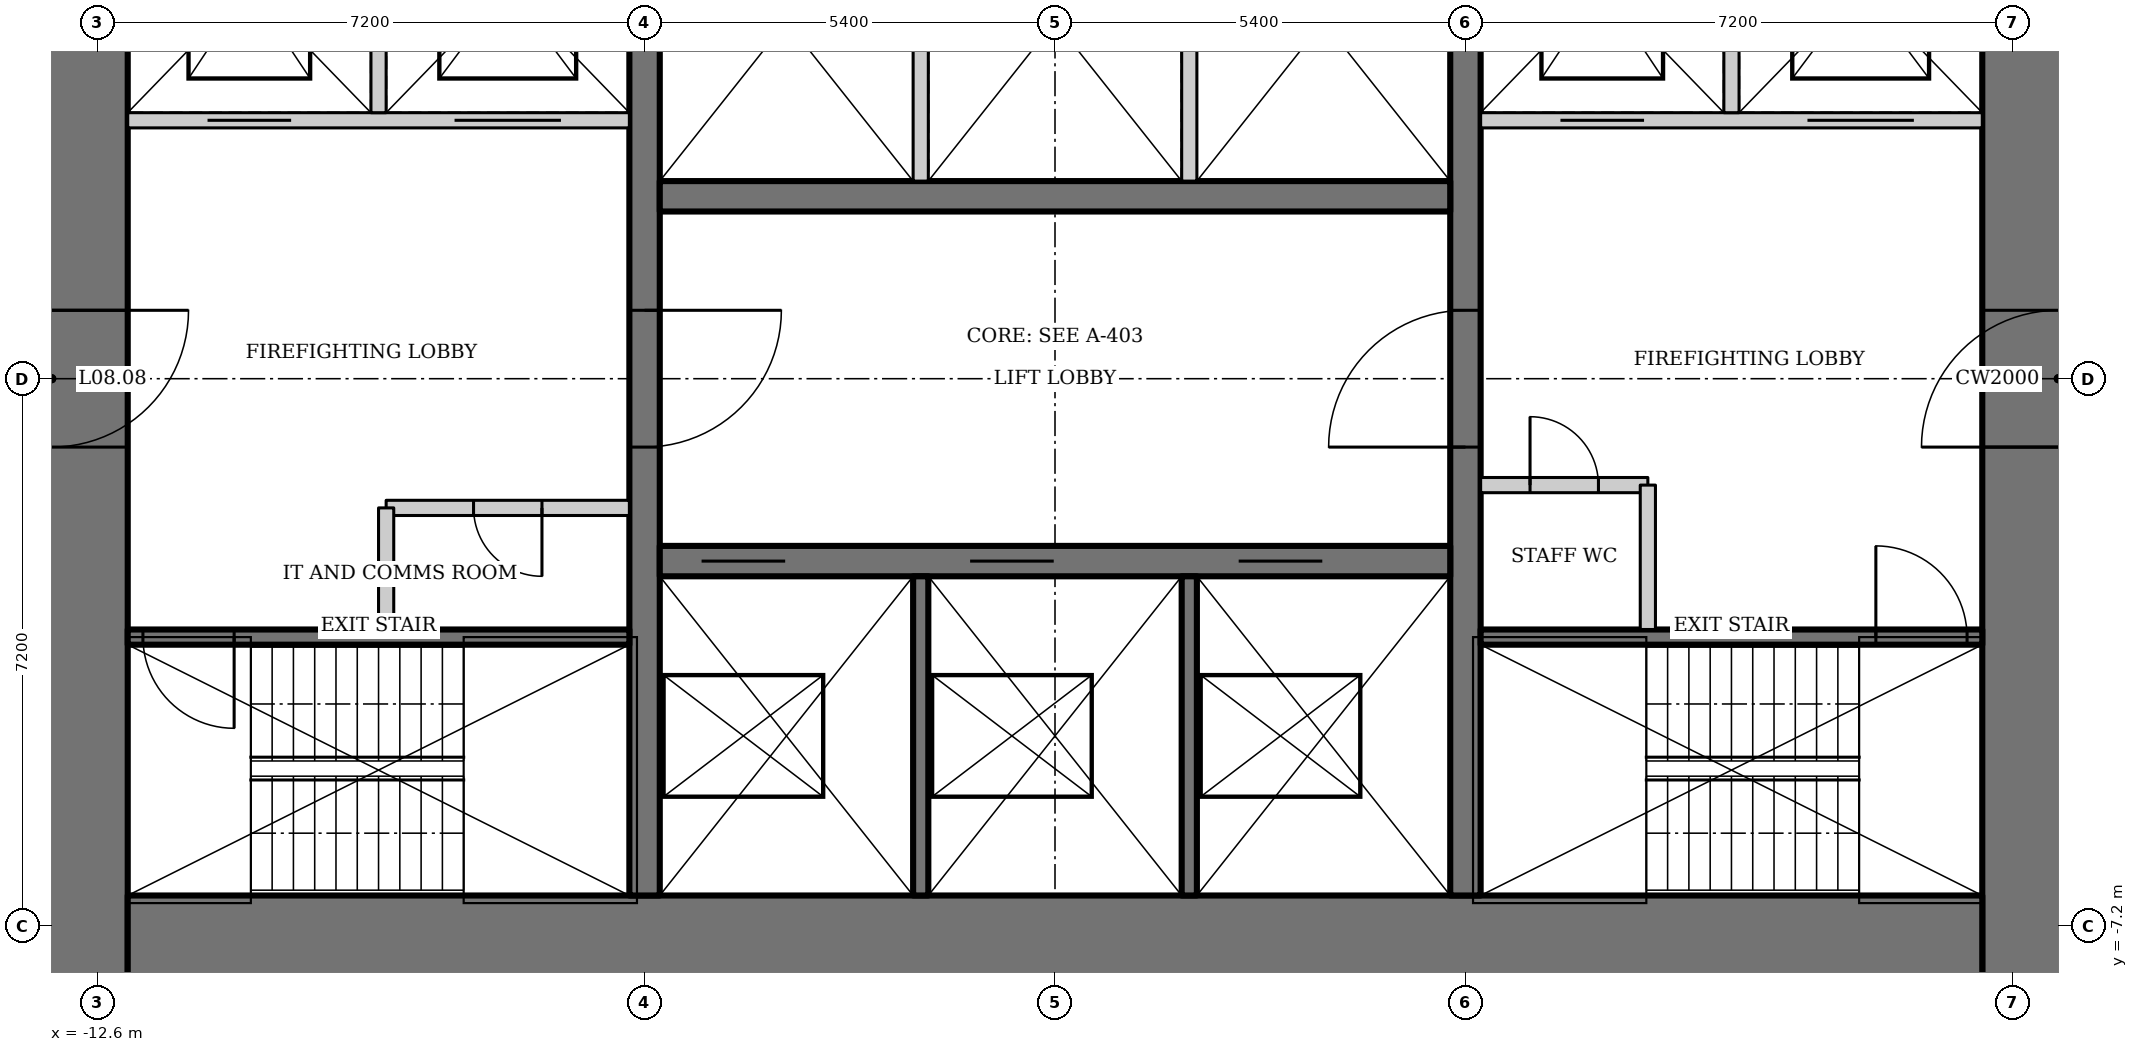
"""IFC4 building model, lengths in metres.
Left out: names, types, materials, properties, quantities, classifications, styles, units other than length and angle.
Written with IfcOpenShell. Run it as: python <this file> out.ifc"""

import sys

from ifc_helpers import new_model, si_unit, direction, frame, frame_2d, origin, place, context, subcontext, project, spatial, rectangle, extrude, element, fill, save


model = new_model("IFC4")
c1 = context("Model", 3, precision=1e-05, world=origin(), true_north=direction((0.0, 1.0)))
c2 = subcontext(c1, "Body", "Model", "MODEL_VIEW")
j1 = project(units=[si_unit("LENGTHUNIT", "METRE"), si_unit("PLANEANGLEUNIT", "RADIAN")], contexts=[c1])
p1 = place(None, origin())
s1 = spatial("IfcSite", under=j1, at=p1, CompositionType="ELEMENT")
p2 = place(p1, origin())
s2 = spatial("IfcBuilding", under=s1, at=p2, CompositionType="ELEMENT")
p3 = place(p2, frame((0.0, 0.0, 44.2)))
s3 = spatial("IfcBuildingStorey", under=s2, at=p3, CompositionType="ELEMENT", Elevation=44.2)
p4 = place(p3, frame((13.2, -13.0, 0.0), z_axis=(0.0, 0.0, 1.0), x_axis=(0.0, 1.0, 0.0)))
e1 = element("IfcWall", 1, at=p4, inside=s3, PredefinedType="SHEAR", context=c2, shape_type="SweptSolid", body=[
    extrude(rectangle(XDim=26.0, YDim=2.0, at=frame_2d((13.0, 0.0))), origin(), (0.0, 0.0, 1.0), 3.6),
])
p5 = place(p4, frame((12.1, 0.0, 0.0)))
e2 = element("IfcOpeningElement", 2, at=p5, cuts=e1, PredefinedType="OPENING", context=c2, shape_type="SweptSolid", body=[
    extrude(rectangle(XDim=1.8, YDim=2.1, at=frame_2d((0.9, 1.05))), frame((0.0, 1.01, 0.0), z_axis=(0.0, -1.0, 0.0), x_axis=(1.0, 0.0, 0.0)), (0.0, 0.0, 1.0), 2.02),
])
p6 = place(p3, frame((-13.2, 13.0, 0.0), z_axis=(0.0, 0.0, 1.0), x_axis=(0.0, -1.0, 0.0)))
e3 = element("IfcWall", 3, at=p6, inside=s3, PredefinedType="SHEAR", context=c2, shape_type="SweptSolid", body=[
    extrude(rectangle(XDim=26.0, YDim=2.0, at=frame_2d((13.0, 0.0))), origin(), (0.0, 0.0, 1.0), 3.6),
])
p7 = place(p6, frame((12.1, 0.0, 0.0)))
e4 = element("IfcOpeningElement", 4, at=p7, cuts=e3, PredefinedType="OPENING", context=c2, shape_type="SweptSolid", body=[
    extrude(rectangle(XDim=1.8, YDim=2.1, at=frame_2d((0.9, 1.05))), frame((0.0, 1.01, 0.0), z_axis=(0.0, -1.0, 0.0), x_axis=(1.0, 0.0, 0.0)), (0.0, 0.0, 1.0), 2.02),
])
p8 = place(p3, frame((-12.2, -8.0, 0.0), z_axis=(0.0, 0.0, 1.0), x_axis=(1.0, 0.0, 0.0)))
e5 = element("IfcWall", 5, at=p8, inside=s3, PredefinedType="SHEAR", context=c2, shape_type="SweptSolid", body=[
    extrude(rectangle(XDim=24.4, YDim=2.4, at=frame_2d((12.2, 0.0))), origin(), (0.0, 0.0, 1.0), 3.6),
])
p9 = place(p3, frame((5.4, -6.8, 0.0), z_axis=(0.0, 0.0, 1.0), x_axis=(0.0, 1.0, 0.0)))
e6 = element("IfcWall", 6, at=p9, inside=s3, PredefinedType="SHEAR", context=c2, shape_type="SweptSolid", body=[
    extrude(rectangle(XDim=13.6, YDim=0.4, at=frame_2d((6.8, 0.0))), origin(), (0.0, 0.0, 1.0), 3.6),
])
p10 = place(p9, frame((5.9, 0.0, 0.0)))
e7 = element("IfcOpeningElement", 7, at=p10, cuts=e6, PredefinedType="OPENING", context=c2, shape_type="SweptSolid", body=[
    extrude(rectangle(XDim=1.8, YDim=2.1, at=frame_2d((0.9, 1.05))), frame((0.0, 0.21, 0.0), z_axis=(0.0, -1.0, 0.0), x_axis=(1.0, 0.0, 0.0)), (0.0, 0.0, 1.0), 0.42),
])
p11 = place(p3, frame((-5.4, 6.8, 0.0), z_axis=(0.0, 0.0, 1.0), x_axis=(0.0, -1.0, 0.0)))
e8 = element("IfcWall", 8, at=p11, inside=s3, PredefinedType="SHEAR", context=c2, shape_type="SweptSolid", body=[
    extrude(rectangle(XDim=13.6, YDim=0.4, at=frame_2d((6.8, 0.0))), origin(), (0.0, 0.0, 1.0), 3.6),
])
p12 = place(p11, frame((5.9, 0.0, 0.0)))
e9 = element("IfcOpeningElement", 9, at=p12, cuts=e8, PredefinedType="OPENING", context=c2, shape_type="SweptSolid", body=[
    extrude(rectangle(XDim=1.8, YDim=2.1, at=frame_2d((0.9, 1.05))), frame((0.0, 0.21, 0.0), z_axis=(0.0, -1.0, 0.0), x_axis=(1.0, 0.0, 0.0)), (0.0, 0.0, 1.0), 0.42),
])
p13 = place(p3, frame((-5.2, -2.4, 0.0), z_axis=(0.0, 0.0, 1.0), x_axis=(1.0, 0.0, 0.0)))
e10 = element("IfcWall", 10, at=p13, inside=s3, PredefinedType="SHEAR", context=c2, shape_type="SweptSolid", body=[
    extrude(rectangle(XDim=10.4, YDim=0.4, at=frame_2d((5.2, 0.0))), origin(), (0.0, 0.0, 1.0), 3.6),
])
p14 = place(p13, frame((0.55, 0.0, 0.0)))
e11 = element("IfcOpeningElement", 11, at=p14, cuts=e10, PredefinedType="OPENING", context=c2, shape_type="SweptSolid", body=[
    extrude(rectangle(XDim=1.1, YDim=2.2, at=frame_2d((0.55, 1.1))), frame((0.0, 0.21, 0.0), z_axis=(0.0, -1.0, 0.0), x_axis=(1.0, 0.0, 0.0)), (0.0, 0.0, 1.0), 0.42),
])
p15 = place(p13, frame((4.083, 0.0, 0.0)))
e12 = element("IfcOpeningElement", 12, at=p15, cuts=e10, PredefinedType="OPENING", context=c2, shape_type="SweptSolid", body=[
    extrude(rectangle(XDim=1.1, YDim=2.2, at=frame_2d((0.55, 1.1))), frame((0.0, 0.21, 0.0), z_axis=(0.0, -1.0, 0.0), x_axis=(1.0, 0.0, 0.0)), (0.0, 0.0, 1.0), 0.42),
])
p16 = place(p13, frame((7.617, 0.0, 0.0)))
e13 = element("IfcOpeningElement", 13, at=p16, cuts=e10, PredefinedType="OPENING", context=c2, shape_type="SweptSolid", body=[
    extrude(rectangle(XDim=1.1, YDim=2.2, at=frame_2d((0.55, 1.1))), frame((0.0, 0.21, 0.0), z_axis=(0.0, -1.0, 0.0), x_axis=(1.0, 0.0, 0.0)), (0.0, 0.0, 1.0), 0.42),
])
for number, where, z_axis, x_axis in (
    (14, (-1.767, -2.6, 0.0), (0.0, 0.0, 1.0), (0.0, -1.0, 0.0)),
    (15, (1.767, -2.6, 0.0), (0.0, 0.0, 1.0), (0.0, -1.0, 0.0)),
):
    element("IfcWall", number, at=place(p3, frame(where, z_axis=z_axis, x_axis=x_axis)), inside=s3, PredefinedType="SOLIDWALL", context=c2, shape_type="SweptSolid", body=[
        extrude(rectangle(XDim=4.2, YDim=0.2, at=frame_2d((2.1, 0.0))), origin(), (0.0, 0.0, 1.0), 3.6),
    ])
p17 = place(p3, frame((5.2, 2.4, 0.0), z_axis=(0.0, 0.0, 1.0), x_axis=(-1.0, 0.0, 0.0)))
e16 = element("IfcWall", 16, at=p17, inside=s3, PredefinedType="SHEAR", context=c2, shape_type="SweptSolid", body=[
    extrude(rectangle(XDim=10.4, YDim=0.4, at=frame_2d((5.2, 0.0))), origin(), (0.0, 0.0, 1.0), 3.6),
])
for number, where, z_axis, x_axis in (
    (17, (-1.767, 2.6, 0.0), (0.0, 0.0, 1.0), (0.0, 1.0, 0.0)),
    (18, (1.767, 2.6, 0.0), (0.0, 0.0, 1.0), (0.0, 1.0, 0.0)),
):
    element("IfcWall", number, at=place(p3, frame(where, z_axis=z_axis, x_axis=x_axis)), inside=s3, PredefinedType="SOLIDWALL", context=c2, shape_type="SweptSolid", body=[
        extrude(rectangle(XDim=4.2, YDim=0.2, at=frame_2d((2.1, 0.0))), origin(), (0.0, 0.0, 1.0), 3.6),
    ])
p18 = place(p3, frame((5.6, -3.4, 0.0), z_axis=(0.0, 0.0, 1.0), x_axis=(1.0, 0.0, 0.0)))
e19 = element("IfcWall", 19, at=p18, inside=s3, PredefinedType="SHEAR", context=c2, shape_type="SweptSolid", body=[
    extrude(rectangle(XDim=6.6, YDim=0.2, at=frame_2d((3.3, 0.0))), origin(), (0.0, 0.0, 1.0), 3.6),
])
p19 = place(p18, frame((5.2, 0.0, 0.0)))
e20 = element("IfcOpeningElement", 20, at=p19, cuts=e19, PredefinedType="OPENING", context=c2, shape_type="SweptSolid", body=[
    extrude(rectangle(XDim=1.2, YDim=2.1, at=frame_2d((0.6, 1.05))), frame((0.0, 0.11, 0.0), z_axis=(0.0, -1.0, 0.0), x_axis=(1.0, 0.0, 0.0)), (0.0, 0.0, 1.0), 0.22),
])
p20 = place(p3, frame((12.2, 3.4, 0.0), z_axis=(0.0, 0.0, 1.0), x_axis=(-1.0, 0.0, 0.0)))
e21 = element("IfcWall", 21, at=p20, inside=s3, PredefinedType="SOLIDWALL", context=c2, shape_type="SweptSolid", body=[
    extrude(rectangle(XDim=6.6, YDim=0.2, at=frame_2d((3.3, 0.0))), origin(), (0.0, 0.0, 1.0), 3.6),
])
p21 = place(p20, frame((4.45, 0.0, 0.0)))
e22 = element("IfcOpeningElement", 22, at=p21, cuts=e21, PredefinedType="OPENING", context=c2, shape_type="SweptSolid", body=[
    extrude(rectangle(XDim=1.1, YDim=2.2, at=frame_2d((0.55, 1.1))), frame((0.0, 0.11, 0.0), z_axis=(0.0, -1.0, 0.0), x_axis=(1.0, 0.0, 0.0)), (0.0, 0.0, 1.0), 0.22),
])
p22 = place(p20, frame((0.9, 0.0, 0.0)))
e23 = element("IfcOpeningElement", 23, at=p22, cuts=e21, PredefinedType="OPENING", context=c2, shape_type="SweptSolid", body=[
    extrude(rectangle(XDim=1.4, YDim=2.2, at=frame_2d((0.7, 1.1))), frame((0.0, 0.11, 0.0), z_axis=(0.0, -1.0, 0.0), x_axis=(1.0, 0.0, 0.0)), (0.0, 0.0, 1.0), 0.22),
])
p23 = place(p3, frame((8.9, 3.5, 0.0), z_axis=(0.0, 0.0, 1.0), x_axis=(0.0, 1.0, 0.0)))
e24 = element("IfcWall", 24, at=p23, inside=s3, PredefinedType="SOLIDWALL", context=c2, shape_type="SweptSolid", body=[
    extrude(rectangle(XDim=3.3, YDim=0.2, at=frame_2d((1.65, 0.0))), origin(), (0.0, 0.0, 1.0), 3.6),
])
p24 = place(p3, frame((-5.6, -3.4, 0.0), z_axis=(0.0, 0.0, 1.0), x_axis=(-1.0, 0.0, 0.0)))
e25 = element("IfcWall", 25, at=p24, inside=s3, PredefinedType="SHEAR", context=c2, shape_type="SweptSolid", body=[
    extrude(rectangle(XDim=6.6, YDim=0.2, at=frame_2d((3.3, 0.0))), origin(), (0.0, 0.0, 1.0), 3.6),
])
p25 = place(p24, frame((5.2, 0.0, 0.0)))
e26 = element("IfcOpeningElement", 26, at=p25, cuts=e25, PredefinedType="OPENING", context=c2, shape_type="SweptSolid", body=[
    extrude(rectangle(XDim=1.2, YDim=2.1, at=frame_2d((0.6, 1.05))), frame((0.0, 0.11, 0.0), z_axis=(0.0, -1.0, 0.0), x_axis=(1.0, 0.0, 0.0)), (0.0, 0.0, 1.0), 0.22),
])
p26 = place(p3, frame((-12.2, 3.4, 0.0), z_axis=(0.0, 0.0, 1.0), x_axis=(1.0, 0.0, 0.0)))
e27 = element("IfcWall", 27, at=p26, inside=s3, PredefinedType="SOLIDWALL", context=c2, shape_type="SweptSolid", body=[
    extrude(rectangle(XDim=6.6, YDim=0.2, at=frame_2d((3.3, 0.0))), origin(), (0.0, 0.0, 1.0), 3.6),
])
p27 = place(p26, frame((1.05, 0.0, 0.0)))
e28 = element("IfcOpeningElement", 28, at=p27, cuts=e27, PredefinedType="OPENING", context=c2, shape_type="SweptSolid", body=[
    extrude(rectangle(XDim=1.1, YDim=2.2, at=frame_2d((0.55, 1.1))), frame((0.0, 0.11, 0.0), z_axis=(0.0, -1.0, 0.0), x_axis=(1.0, 0.0, 0.0)), (0.0, 0.0, 1.0), 0.22),
])
p28 = place(p26, frame((4.3, 0.0, 0.0)))
e29 = element("IfcOpeningElement", 29, at=p28, cuts=e27, PredefinedType="OPENING", context=c2, shape_type="SweptSolid", body=[
    extrude(rectangle(XDim=1.4, YDim=2.2, at=frame_2d((0.7, 1.1))), frame((0.0, 0.11, 0.0), z_axis=(0.0, -1.0, 0.0), x_axis=(1.0, 0.0, 0.0)), (0.0, 0.0, 1.0), 0.22),
])
p29 = place(p3, frame((-8.9, 3.5, 0.0), z_axis=(0.0, 0.0, 1.0), x_axis=(0.0, 1.0, 0.0)))
e30 = element("IfcWall", 30, at=p29, inside=s3, PredefinedType="SOLIDWALL", context=c2, shape_type="SweptSolid", body=[
    extrude(rectangle(XDim=3.3, YDim=0.2, at=frame_2d((1.65, 0.0))), origin(), (0.0, 0.0, 1.0), 3.6),
])
p30 = place(p3, frame((-5.6, -1.7, 0.0), z_axis=(0.0, 0.0, 1.0), x_axis=(-1.0, 0.0, 0.0)))
e31 = element("IfcWall", 31, at=p30, inside=s3, PredefinedType="SOLIDWALL", context=c2, shape_type="SweptSolid", body=[
    extrude(rectangle(XDim=3.2, YDim=0.2, at=frame_2d((1.6, 0.0))), origin(), (0.0, 0.0, 1.0), 3.45),
])
p31 = place(p30, frame((1.15, 0.0, 0.0)))
e32 = element("IfcOpeningElement", 32, at=p31, cuts=e31, PredefinedType="OPENING", context=c2, shape_type="SweptSolid", body=[
    extrude(rectangle(XDim=0.9, YDim=2.1, at=frame_2d((0.45, 1.05))), frame((0.0, 0.11, 0.0), z_axis=(0.0, -1.0, 0.0), x_axis=(1.0, 0.0, 0.0)), (0.0, 0.0, 1.0), 0.22),
])
p32 = place(p3, frame((-8.8, -1.7, 0.0), z_axis=(0.0, 0.0, 1.0), x_axis=(0.0, -1.0, 0.0)))
e33 = element("IfcWall", 33, at=p32, inside=s3, PredefinedType="SOLIDWALL", context=c2, shape_type="SweptSolid", body=[
    extrude(rectangle(XDim=1.6, YDim=0.2, at=frame_2d((0.8, 0.0))), origin(), (0.0, 0.0, 1.0), 3.45),
])
p33 = place(p3, frame((5.6, -1.4, 0.0), z_axis=(0.0, 0.0, 1.0), x_axis=(1.0, 0.0, 0.0)))
e34 = element("IfcWall", 34, at=p33, inside=s3, PredefinedType="SOLIDWALL", context=c2, shape_type="SweptSolid", body=[
    extrude(rectangle(XDim=2.2, YDim=0.2, at=frame_2d((1.1, 0.0))), origin(), (0.0, 0.0, 1.0), 3.45),
])
p34 = place(p33, frame((0.65, 0.0, 0.0)))
e35 = element("IfcOpeningElement", 35, at=p34, cuts=e34, PredefinedType="OPENING", context=c2, shape_type="SweptSolid", body=[
    extrude(rectangle(XDim=0.9, YDim=2.1, at=frame_2d((0.45, 1.05))), frame((0.0, 0.11, 0.0), z_axis=(0.0, -1.0, 0.0), x_axis=(1.0, 0.0, 0.0)), (0.0, 0.0, 1.0), 0.22),
])
p35 = place(p3, frame((7.8, -1.4, 0.0), z_axis=(0.0, 0.0, 1.0), x_axis=(0.0, -1.0, 0.0)))
e36 = element("IfcWall", 36, at=p35, inside=s3, PredefinedType="SOLIDWALL", context=c2, shape_type="SweptSolid", body=[
    extrude(rectangle(XDim=1.9, YDim=0.2, at=frame_2d((0.95, 0.0))), origin(), (0.0, 0.0, 1.0), 3.45),
])
p36 = place(p31, origin())
e37 = element("IfcDoor", 37, at=p36, inside=s3, OperationType="SINGLE_SWING_LEFT", PredefinedType="DOOR", context=c2, shape_type="SweptSolid", body=[
    extrude(rectangle(XDim=0.9, YDim=2.1, at=frame_2d((0.45, 1.05))), frame((0.0, 0.025, 0.0), z_axis=(0.0, -1.0, 0.0), x_axis=(1.0, 0.0, 0.0)), (0.0, 0.0, 1.0), 0.05),
])
fill(e32, e37)
p37 = place(p34, origin())
e38 = element("IfcDoor", 38, at=p37, inside=s3, OperationType="SINGLE_SWING_LEFT", PredefinedType="DOOR", context=c2, shape_type="SweptSolid", body=[
    extrude(rectangle(XDim=0.9, YDim=2.1, at=frame_2d((0.45, 1.05))), frame((0.0, 0.025, 0.0), z_axis=(0.0, -1.0, 0.0), x_axis=(1.0, 0.0, 0.0)), (0.0, 0.0, 1.0), 0.05),
])
fill(e35, e38)
p38 = place(p10, origin())
e39 = element("IfcDoor", 39, at=p38, inside=s3, OperationType="DOUBLE_DOOR_DOUBLE_SWING", PredefinedType="DOOR", context=c2, shape_type="SweptSolid", body=[
    extrude(rectangle(XDim=1.8, YDim=2.1, at=frame_2d((0.9, 1.05))), frame((0.0, 0.025, 0.0), z_axis=(0.0, -1.0, 0.0), x_axis=(1.0, 0.0, 0.0)), (0.0, 0.0, 1.0), 0.05),
])
fill(e7, e39)
p39 = place(p12, origin())
e40 = element("IfcDoor", 40, at=p39, inside=s3, OperationType="DOUBLE_DOOR_DOUBLE_SWING", PredefinedType="DOOR", context=c2, shape_type="SweptSolid", body=[
    extrude(rectangle(XDim=1.8, YDim=2.1, at=frame_2d((0.9, 1.05))), frame((0.0, 0.025, 0.0), z_axis=(0.0, -1.0, 0.0), x_axis=(1.0, 0.0, 0.0)), (0.0, 0.0, 1.0), 0.05),
])
fill(e9, e40)
p40 = place(p19, origin())
e41 = element("IfcDoor", 41, at=p40, inside=s3, OperationType="SINGLE_SWING_RIGHT", PredefinedType="DOOR", context=c2, shape_type="SweptSolid", body=[
    extrude(rectangle(XDim=1.2, YDim=2.1, at=frame_2d((0.6, 1.05))), frame((0.0, 0.025, 0.0), z_axis=(0.0, -1.0, 0.0), x_axis=(1.0, 0.0, 0.0)), (0.0, 0.0, 1.0), 0.05),
])
fill(e20, e41)
p41 = place(p25, origin())
e42 = element("IfcDoor", 42, at=p41, inside=s3, OperationType="SINGLE_SWING_RIGHT", PredefinedType="DOOR", context=c2, shape_type="SweptSolid", body=[
    extrude(rectangle(XDim=1.2, YDim=2.1, at=frame_2d((0.6, 1.05))), frame((0.0, 0.025, 0.0), z_axis=(0.0, -1.0, 0.0), x_axis=(1.0, 0.0, 0.0)), (0.0, 0.0, 1.0), 0.05),
])
fill(e26, e42)
p42 = place(p5, origin())
e43 = element("IfcDoor", 43, at=p42, inside=s3, OperationType="DOUBLE_DOOR_DOUBLE_SWING", PredefinedType="DOOR", context=c2, shape_type="SweptSolid", body=[
    extrude(rectangle(XDim=1.8, YDim=2.1, at=frame_2d((0.9, 1.05))), frame((0.0, 0.025, 0.0), z_axis=(0.0, -1.0, 0.0), x_axis=(1.0, 0.0, 0.0)), (0.0, 0.0, 1.0), 0.05),
])
fill(e2, e43)
p43 = place(p7, origin())
e44 = element("IfcDoor", 44, at=p43, inside=s3, OperationType="DOUBLE_DOOR_DOUBLE_SWING", PredefinedType="DOOR", context=c2, shape_type="SweptSolid", body=[
    extrude(rectangle(XDim=1.8, YDim=2.1, at=frame_2d((0.9, 1.05))), frame((0.0, 0.025, 0.0), z_axis=(0.0, -1.0, 0.0), x_axis=(1.0, 0.0, 0.0)), (0.0, 0.0, 1.0), 0.05),
])
fill(e4, e44)
p44 = place(p14, origin())
e45 = element("IfcDoor", 45, at=p44, inside=s3, OperationType="DOUBLE_DOOR_SLIDING", PredefinedType="DOOR", context=c2, shape_type="SweptSolid", body=[
    extrude(rectangle(XDim=1.1, YDim=2.2, at=frame_2d((0.55, 1.1))), frame((0.0, 0.025, 0.0), z_axis=(0.0, -1.0, 0.0), x_axis=(1.0, 0.0, 0.0)), (0.0, 0.0, 1.0), 0.05),
])
fill(e11, e45)
p45 = place(p15, origin())
e46 = element("IfcDoor", 46, at=p45, inside=s3, OperationType="DOUBLE_DOOR_SLIDING", PredefinedType="DOOR", context=c2, shape_type="SweptSolid", body=[
    extrude(rectangle(XDim=1.1, YDim=2.2, at=frame_2d((0.55, 1.1))), frame((0.0, 0.025, 0.0), z_axis=(0.0, -1.0, 0.0), x_axis=(1.0, 0.0, 0.0)), (0.0, 0.0, 1.0), 0.05),
])
fill(e12, e46)
p46 = place(p16, origin())
e47 = element("IfcDoor", 47, at=p46, inside=s3, OperationType="DOUBLE_DOOR_SLIDING", PredefinedType="DOOR", context=c2, shape_type="SweptSolid", body=[
    extrude(rectangle(XDim=1.1, YDim=2.2, at=frame_2d((0.55, 1.1))), frame((0.0, 0.025, 0.0), z_axis=(0.0, -1.0, 0.0), x_axis=(1.0, 0.0, 0.0)), (0.0, 0.0, 1.0), 0.05),
])
fill(e13, e47)
p47 = place(p27, origin())
e48 = element("IfcDoor", 48, at=p47, inside=s3, OperationType="DOUBLE_DOOR_SLIDING", PredefinedType="DOOR", context=c2, shape_type="SweptSolid", body=[
    extrude(rectangle(XDim=1.1, YDim=2.2, at=frame_2d((0.55, 1.1))), frame((0.0, 0.025, 0.0), z_axis=(0.0, -1.0, 0.0), x_axis=(1.0, 0.0, 0.0)), (0.0, 0.0, 1.0), 0.05),
])
fill(e28, e48)
p48 = place(p28, origin())
e49 = element("IfcDoor", 49, at=p48, inside=s3, OperationType="DOUBLE_DOOR_SLIDING", PredefinedType="DOOR", context=c2, shape_type="SweptSolid", body=[
    extrude(rectangle(XDim=1.4, YDim=2.2, at=frame_2d((0.7, 1.1))), frame((0.0, 0.025, 0.0), z_axis=(0.0, -1.0, 0.0), x_axis=(1.0, 0.0, 0.0)), (0.0, 0.0, 1.0), 0.05),
])
fill(e29, e49)
p49 = place(p21, origin())
e50 = element("IfcDoor", 50, at=p49, inside=s3, OperationType="DOUBLE_DOOR_SLIDING", PredefinedType="DOOR", context=c2, shape_type="SweptSolid", body=[
    extrude(rectangle(XDim=1.1, YDim=2.2, at=frame_2d((0.55, 1.1))), frame((0.0, 0.025, 0.0), z_axis=(0.0, -1.0, 0.0), x_axis=(1.0, 0.0, 0.0)), (0.0, 0.0, 1.0), 0.05),
])
fill(e22, e50)
p50 = place(p22, origin())
e51 = element("IfcDoor", 51, at=p50, inside=s3, OperationType="DOUBLE_DOOR_SLIDING", PredefinedType="DOOR", context=c2, shape_type="SweptSolid", body=[
    extrude(rectangle(XDim=1.4, YDim=2.2, at=frame_2d((0.7, 1.1))), frame((0.0, 0.025, 0.0), z_axis=(0.0, -1.0, 0.0), x_axis=(1.0, 0.0, 0.0)), (0.0, 0.0, 1.0), 0.05),
])
fill(e23, e51)
save(model, sys.argv[1])
